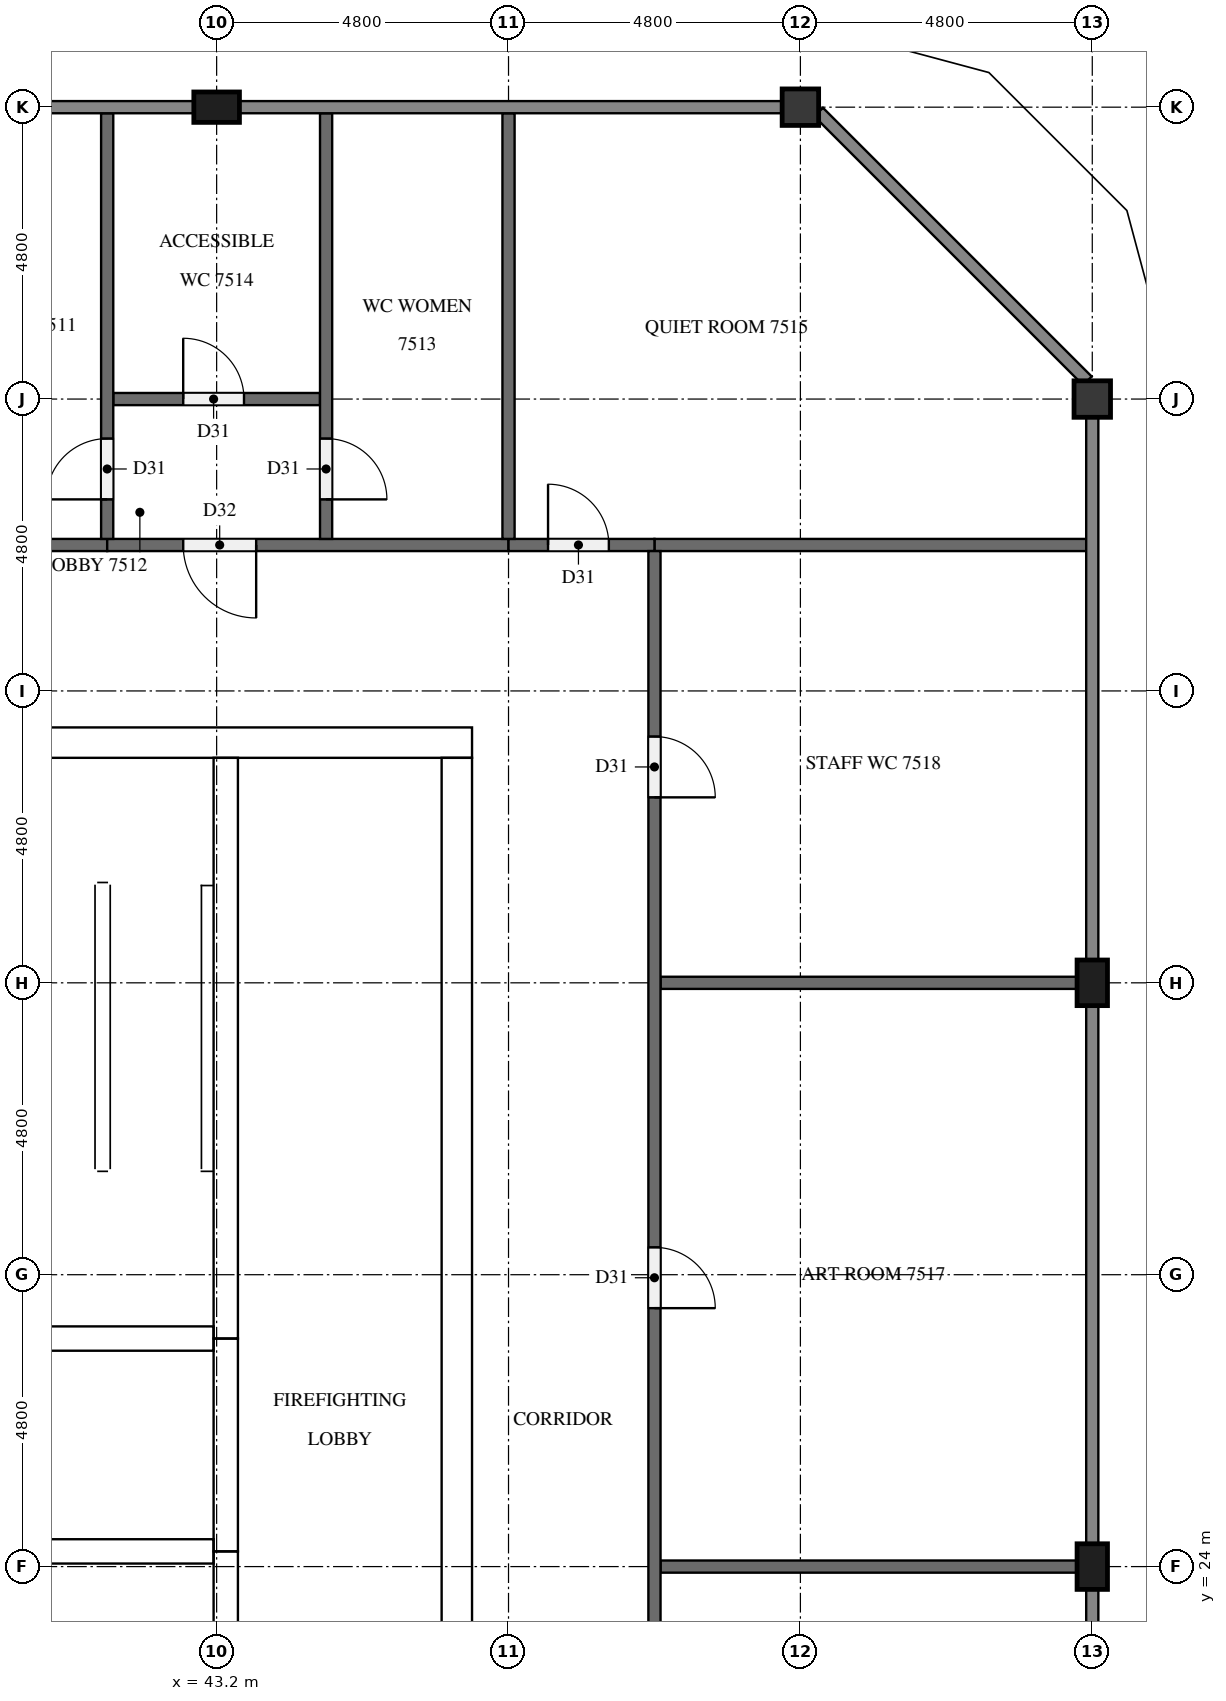
"""IFC4 building model, lengths in metres.
Left out: names, types, materials, properties, quantities, classifications, styles, units other than length and angle.
Written with IfcOpenShell. Run it as: python <this file> out.ifc"""

import sys

from ifc_helpers import new_model, si_unit, direction, frame, frame_2d, origin, origin_2d, place, context, subcontext, project, spatial, rectangle, extrude, element, fill, save


model = new_model("IFC4")
c1 = context("Model", 3, precision=1e-05, world=origin(), true_north=direction((0.0, 1.0)))
c2 = subcontext(c1, "Body", "Model", "MODEL_VIEW")
j1 = project(units=[si_unit("LENGTHUNIT", "METRE"), si_unit("PLANEANGLEUNIT", "RADIAN")], contexts=[c1])
p1 = place(None, origin())
s1 = spatial("IfcSite", under=j1, at=p1, CompositionType="ELEMENT")
p2 = place(p1, origin())
s2 = spatial("IfcBuilding", under=s1, at=p2, CompositionType="ELEMENT")
p3 = place(p2, frame((0.0, 0.0, 286.1)))
s3 = spatial("IfcBuildingStorey", under=s2, at=p3, CompositionType="ELEMENT", Elevation=286.1)
p4 = place(p3, frame((15.0, 37.55, 0.0), z_axis=(0.0, 0.0, 1.0), x_axis=(1.0, 0.0, 0.0)))
e1 = element("IfcWall", 1, at=p4, inside=s3, PredefinedType="SHEAR", context=c2, shape_type="SweptSolid", body=[
    extrude(rectangle(XDim=32.4, YDim=0.5, at=frame_2d((16.2, 0.0))), origin(), (0.0, 0.0, 1.0), 5.1),
])
p5 = place(p4, frame((15.3, 0.0, 0.0)))
e2 = element("IfcOpeningElement", 2, at=p5, cuts=e1, PredefinedType="OPENING", context=c2, shape_type="SweptSolid", body=[
    extrude(rectangle(XDim=1.8, YDim=2.1, at=frame_2d((0.9, 1.05))), frame((0.0, 0.26, 0.0), z_axis=(0.0, -1.0, 0.0), x_axis=(1.0, 0.0, 0.0)), (0.0, 0.0, 1.0), 0.52),
])
p6 = place(p4, frame((1.282, 0.0, 0.0)))
e3 = element("IfcOpeningElement", 3, at=p6, cuts=e1, PredefinedType="OPENING", context=c2, shape_type="SweptSolid", body=[
    extrude(rectangle(XDim=1.0, YDim=2.1, at=frame_2d((0.5, 1.05))), frame((0.0, 0.26, 0.0), z_axis=(0.0, -1.0, 0.0), x_axis=(1.0, 0.0, 0.0)), (0.0, 0.0, 1.0), 0.52),
])
p7 = place(p4, frame((5.082, 0.0, 0.0)))
e4 = element("IfcOpeningElement", 4, at=p7, cuts=e1, PredefinedType="OPENING", context=c2, shape_type="SweptSolid", body=[
    extrude(rectangle(XDim=1.0, YDim=2.1, at=frame_2d((0.5, 1.05))), frame((0.0, 0.26, 0.0), z_axis=(0.0, -1.0, 0.0), x_axis=(1.0, 0.0, 0.0)), (0.0, 0.0, 1.0), 0.52),
])
p8 = place(p3, frame((47.15, 15.5, 0.0), z_axis=(0.0, 0.0, 1.0), x_axis=(0.0, 1.0, 0.0)))
e5 = element("IfcWall", 5, at=p8, inside=s3, PredefinedType="SHEAR", context=c2, shape_type="SweptSolid", body=[
    extrude(rectangle(XDim=21.8, YDim=0.5, at=frame_2d((10.9, 0.0))), origin(), (0.0, 0.0, 1.0), 5.1),
])
p9 = place(p8, frame((10.6, 0.0, 0.0)))
e6 = element("IfcOpeningElement", 6, at=p9, cuts=e5, PredefinedType="OPENING", context=c2, shape_type="SweptSolid", body=[
    extrude(rectangle(XDim=1.2, YDim=2.1, at=frame_2d((0.6, 1.05))), frame((0.0, 0.26, 0.0), z_axis=(0.0, -1.0, 0.0), x_axis=(1.0, 0.0, 0.0)), (0.0, 0.0, 1.0), 0.52),
])
p10 = place(p3, frame((43.35, 15.5, 0.0), z_axis=(0.0, 0.0, 1.0), x_axis=(0.0, 1.0, 0.0)))
e7 = element("IfcWall", 7, at=p10, inside=s3, PredefinedType="SHEAR", context=c2, shape_type="SweptSolid", body=[
    extrude(rectangle(XDim=8.75, YDim=0.4, at=frame_2d((4.375, 0.0))), origin(), (0.0, 0.0, 1.0), 5.1),
])
p11 = place(p10, frame((0.7, 0.0, 0.0)))
e8 = element("IfcOpeningElement", 8, at=p11, cuts=e7, PredefinedType="OPENING", context=c2, shape_type="SweptSolid", body=[
    extrude(rectangle(XDim=1.2, YDim=2.1, at=frame_2d((0.6, 1.05))), frame((0.0, 0.21, 0.0), z_axis=(0.0, -1.0, 0.0), x_axis=(1.0, 0.0, 0.0)), (0.0, 0.0, 1.0), 0.42),
])
p12 = place(p3, frame((43.35, 24.25, 0.0), z_axis=(0.0, 0.0, 1.0), x_axis=(0.0, 1.0, 0.0)))
e9 = element("IfcWall", 9, at=p12, inside=s3, PredefinedType="SHEAR", context=c2, shape_type="SweptSolid", body=[
    extrude(rectangle(XDim=3.5, YDim=0.4, at=frame_2d((1.75, 0.0))), origin(), (0.0, 0.0, 1.0), 5.1),
])
p13 = place(p12, frame((1.2, 0.0, 0.0)))
e10 = element("IfcOpeningElement", 10, at=p13, cuts=e9, PredefinedType="OPENING", context=c2, shape_type="SweptSolid", body=[
    extrude(rectangle(XDim=1.1, YDim=2.1, at=frame_2d((0.55, 1.05))), frame((0.0, 0.21, 0.0), z_axis=(0.0, -1.0, 0.0), x_axis=(1.0, 0.0, 0.0)), (0.0, 0.0, 1.0), 0.42),
])
p14 = place(p3, frame((43.35, 27.75, 0.0), z_axis=(0.0, 0.0, 1.0), x_axis=(0.0, 1.0, 0.0)))
e11 = element("IfcWall", 11, at=p14, inside=s3, PredefinedType="SHEAR", context=c2, shape_type="SweptSolid", body=[
    extrude(rectangle(XDim=9.55, YDim=0.4, at=frame_2d((4.775, 0.0))), origin(), (0.0, 0.0, 1.0), 5.1),
])
p15 = place(p14, frame((7.65, 0.0, 0.0)))
e12 = element("IfcOpeningElement", 12, at=p15, cuts=e11, PredefinedType="OPENING", context=c2, shape_type="SweptSolid", body=[
    extrude(rectangle(XDim=1.2, YDim=2.1, at=frame_2d((0.6, 1.05))), frame((0.0, 0.21, 0.0), z_axis=(0.0, -1.0, 0.0), x_axis=(1.0, 0.0, 0.0)), (0.0, 0.0, 1.0), 0.42),
])
for number, where, z_axis, x_axis in (
    (13, (39.5, 24.25, 0.0), (0.0, 0.0, 1.0), (1.0, 0.0, 0.0)),
    (14, (39.5, 27.75, 0.0), (0.0, 0.0, 1.0), (1.0, 0.0, 0.0)),
):
    element("IfcWall", number, at=place(p3, frame(where, z_axis=z_axis, x_axis=x_axis)), inside=s3, PredefinedType="SHEAR", context=c2, shape_type="SweptSolid", body=[
        extrude(rectangle(XDim=3.65, YDim=0.4, at=frame_2d((1.825, 0.0))), origin(), (0.0, 0.0, 1.0), 5.1),
    ])
for number, where, z_axis, x_axis in (
    (15, (57.6, 24.0, 0.0), (0.0, 0.0, 1.0), (0.0, 1.0, 0.0)),
    (16, (57.6, 33.6, 0.0), (0.0, 0.0, 1.0), (0.0, 1.0, 0.0)),
):
    element("IfcColumn", number, at=place(p3, frame(where, z_axis=z_axis, x_axis=x_axis)), inside=s3, PredefinedType="COLUMN", context=c2, shape_type="SweptSolid", body=[
        extrude(rectangle(XDim=0.75, YDim=0.5, at=origin_2d()), origin(), (0.0, 0.0, 1.0), 5.1),
    ])
for number, where, z_axis, x_axis in (
    (17, (57.6, 43.2, 0.0), (0.0, 0.0, 1.0), (1.0, 0.0, 0.0)),
    (18, (52.8, 48.0, 0.0), (0.0, 0.0, 1.0), (1.0, 0.0, 0.0)),
):
    element("IfcColumn", number, at=place(p3, frame(where, z_axis=z_axis, x_axis=x_axis)), inside=s3, PredefinedType="COLUMN", context=c2, shape_type="SweptSolid", body=[
        extrude(rectangle(XDim=0.6, YDim=0.6, at=origin_2d()), origin(), (0.0, 0.0, 1.0), 5.1),
    ])
p16 = place(p3, frame((43.2, 48.0, 0.0), z_axis=(0.0, 0.0, 1.0), x_axis=(1.0, 0.0, 0.0)))
e19 = element("IfcColumn", 19, at=p16, inside=s3, PredefinedType="COLUMN", context=c2, shape_type="SweptSolid", body=[
    extrude(rectangle(XDim=0.75, YDim=0.5, at=origin_2d()), origin(), (0.0, 0.0, 1.0), 5.1),
])
for number, where, z_axis, x_axis in (
    (20, (50.5, 24.0, 0.0), (0.0, 0.0, 1.0), (1.0, 0.0, 0.0)),
    (21, (50.5, 33.6, 0.0), (0.0, 0.0, 1.0), (1.0, 0.0, 0.0)),
):
    element("IfcWall", number, at=place(p3, frame(where, z_axis=z_axis, x_axis=x_axis)), inside=s3, PredefinedType="PARTITIONING", context=c2, shape_type="SweptSolid", body=[
        extrude(rectangle(XDim=7.0, YDim=0.2, at=frame_2d((3.5, 0.0))), origin(), (0.0, 0.0, 1.0), 5.1),
    ])
p17 = place(p3, frame((50.4, 40.8, 0.0), z_axis=(0.0, 0.0, 1.0), x_axis=(1.0, 0.0, 0.0)))
e22 = element("IfcWall", 22, at=p17, inside=s3, PredefinedType="PARTITIONING", context=c2, shape_type="SweptSolid", body=[
    extrude(rectangle(XDim=7.1, YDim=0.2, at=frame_2d((3.55, 0.0))), origin(), (0.0, 0.0, 1.0), 5.1),
])
p18 = place(p3, frame((12.0, 40.8, 0.0), z_axis=(0.0, 0.0, 1.0), x_axis=(1.0, 0.0, 0.0)))
e23 = element("IfcWall", 23, at=p18, inside=s3, PredefinedType="PARTITIONING", context=c2, shape_type="SweptSolid", body=[
    extrude(rectangle(XDim=29.4, YDim=0.2, at=frame_2d((14.7, 0.0))), origin(), (0.0, 0.0, 1.0), 5.1),
])
p19 = place(p18, frame((3.05, 0.0, 0.0)))
e24 = element("IfcOpeningElement", 24, at=p19, cuts=e23, PredefinedType="OPENING", context=c2, shape_type="SweptSolid", body=[
    extrude(rectangle(XDim=1.0, YDim=2.1, at=frame_2d((0.5, 1.05))), frame((0.0, 0.11, 0.0), z_axis=(0.0, -1.0, 0.0), x_axis=(1.0, 0.0, 0.0)), (0.0, 0.0, 1.0), 0.22),
])
p20 = place(p18, frame((11.55, 0.0, 0.0)))
e25 = element("IfcOpeningElement", 25, at=p20, cuts=e23, PredefinedType="OPENING", context=c2, shape_type="SweptSolid", body=[
    extrude(rectangle(XDim=1.0, YDim=2.1, at=frame_2d((0.5, 1.05))), frame((0.0, 0.11, 0.0), z_axis=(0.0, -1.0, 0.0), x_axis=(1.0, 0.0, 0.0)), (0.0, 0.0, 1.0), 0.22),
])
p21 = place(p18, frame((21.05, 0.0, 0.0)))
e26 = element("IfcOpeningElement", 26, at=p21, cuts=e23, PredefinedType="OPENING", context=c2, shape_type="SweptSolid", body=[
    extrude(rectangle(XDim=1.0, YDim=2.1, at=frame_2d((0.5, 1.05))), frame((0.0, 0.11, 0.0), z_axis=(0.0, -1.0, 0.0), x_axis=(1.0, 0.0, 0.0)), (0.0, 0.0, 1.0), 0.22),
])
p22 = place(p3, frame((48.0, 40.8, 0.0), z_axis=(0.0, 0.0, 1.0), x_axis=(-1.0, 0.0, 0.0)))
e27 = element("IfcWall", 27, at=p22, inside=s3, PredefinedType="PARTITIONING", context=c2, shape_type="SweptSolid", body=[
    extrude(rectangle(XDim=6.6, YDim=0.2, at=frame_2d((3.3, 0.0))), origin(), (0.0, 0.0, 1.0), 5.1),
])
p23 = place(p22, frame((4.15, 0.0, 0.0)))
e28 = element("IfcOpeningElement", 28, at=p23, cuts=e27, PredefinedType="OPENING", context=c2, shape_type="SweptSolid", body=[
    extrude(rectangle(XDim=1.2, YDim=2.1, at=frame_2d((0.6, 1.05))), frame((0.0, 0.11, 0.0), z_axis=(0.0, -1.0, 0.0), x_axis=(1.0, 0.0, 0.0)), (0.0, 0.0, 1.0), 0.22),
])
p24 = place(p3, frame((48.0, 40.8, 0.0), z_axis=(0.0, 0.0, 1.0), x_axis=(1.0, 0.0, 0.0)))
e29 = element("IfcWall", 29, at=p24, inside=s3, PredefinedType="PARTITIONING", context=c2, shape_type="SweptSolid", body=[
    extrude(rectangle(XDim=2.4, YDim=0.2, at=frame_2d((1.2, 0.0))), origin(), (0.0, 0.0, 1.0), 5.1),
])
p25 = place(p24, frame((0.65, 0.0, 0.0)))
e30 = element("IfcOpeningElement", 30, at=p25, cuts=e29, PredefinedType="OPENING", context=c2, shape_type="SweptSolid", body=[
    extrude(rectangle(XDim=1.0, YDim=2.1, at=frame_2d((0.5, 1.05))), frame((0.0, 0.11, 0.0), z_axis=(0.0, -1.0, 0.0), x_axis=(1.0, 0.0, 0.0)), (0.0, 0.0, 1.0), 0.22),
])
p26 = place(p3, frame((41.5, 43.2, 0.0), z_axis=(0.0, 0.0, 1.0), x_axis=(1.0, 0.0, 0.0)))
e31 = element("IfcWall", 31, at=p26, inside=s3, PredefinedType="PARTITIONING", context=c2, shape_type="SweptSolid", body=[
    extrude(rectangle(XDim=3.4, YDim=0.2, at=frame_2d((1.7, 0.0))), origin(), (0.0, 0.0, 1.0), 5.1),
])
p27 = place(p26, frame((1.15, 0.0, 0.0)))
e32 = element("IfcOpeningElement", 32, at=p27, cuts=e31, PredefinedType="OPENING", context=c2, shape_type="SweptSolid", body=[
    extrude(rectangle(XDim=1.0, YDim=2.1, at=frame_2d((0.5, 1.05))), frame((0.0, 0.11, 0.0), z_axis=(0.0, -1.0, 0.0), x_axis=(1.0, 0.0, 0.0)), (0.0, 0.0, 1.0), 0.22),
])
p28 = place(p3, frame((41.4, 40.9, 0.0), z_axis=(0.0, 0.0, 1.0), x_axis=(0.0, 1.0, 0.0)))
e33 = element("IfcWall", 33, at=p28, inside=s3, PredefinedType="PARTITIONING", context=c2, shape_type="SweptSolid", body=[
    extrude(rectangle(XDim=7.0, YDim=0.2, at=frame_2d((3.5, 0.0))), origin(), (0.0, 0.0, 1.0), 5.1),
])
p29 = place(p28, frame((0.65, 0.0, 0.0)))
e34 = element("IfcOpeningElement", 34, at=p29, cuts=e33, PredefinedType="OPENING", context=c2, shape_type="SweptSolid", body=[
    extrude(rectangle(XDim=1.0, YDim=2.1, at=frame_2d((0.5, 1.05))), frame((0.0, 0.11, 0.0), z_axis=(0.0, -1.0, 0.0), x_axis=(1.0, 0.0, 0.0)), (0.0, 0.0, 1.0), 0.22),
])
p30 = place(p3, frame((45.0, 47.9, 0.0), z_axis=(0.0, 0.0, 1.0), x_axis=(0.0, -1.0, 0.0)))
e35 = element("IfcWall", 35, at=p30, inside=s3, PredefinedType="PARTITIONING", context=c2, shape_type="SweptSolid", body=[
    extrude(rectangle(XDim=7.0, YDim=0.2, at=frame_2d((3.5, 0.0))), origin(), (0.0, 0.0, 1.0), 5.1),
])
p31 = place(p30, frame((5.35, 0.0, 0.0)))
e36 = element("IfcOpeningElement", 36, at=p31, cuts=e35, PredefinedType="OPENING", context=c2, shape_type="SweptSolid", body=[
    extrude(rectangle(XDim=1.0, YDim=2.1, at=frame_2d((0.5, 1.05))), frame((0.0, 0.11, 0.0), z_axis=(0.0, -1.0, 0.0), x_axis=(1.0, 0.0, 0.0)), (0.0, 0.0, 1.0), 0.22),
])
p32 = place(p3, frame((48.0, 40.9, 0.0), z_axis=(0.0, 0.0, 1.0), x_axis=(0.0, 1.0, 0.0)))
e37 = element("IfcWall", 37, at=p32, inside=s3, PredefinedType="PARTITIONING", context=c2, shape_type="SweptSolid", body=[
    extrude(rectangle(XDim=7.0, YDim=0.2, at=frame_2d((3.5, 0.0))), origin(), (0.0, 0.0, 1.0), 5.1),
])
p33 = place(p3, frame((50.4, 40.7, 0.0), z_axis=(0.0, 0.0, 1.0), x_axis=(0.0, -1.0, 0.0)))
e38 = element("IfcWall", 38, at=p33, inside=s3, PredefinedType="PARTITIONING", context=c2, shape_type="SweptSolid", body=[
    extrude(rectangle(XDim=28.6, YDim=0.2, at=frame_2d((14.3, 0.0))), origin(), (0.0, 0.0, 1.0), 5.1),
])
p34 = place(p33, frame((22.15, 0.0, 0.0)))
e39 = element("IfcOpeningElement", 39, at=p34, cuts=e38, PredefinedType="OPENING", context=c2, shape_type="SweptSolid", body=[
    extrude(rectangle(XDim=1.0, YDim=2.1, at=frame_2d((0.5, 1.05))), frame((0.0, 0.11, 0.0), z_axis=(0.0, -1.0, 0.0), x_axis=(1.0, 0.0, 0.0)), (0.0, 0.0, 1.0), 0.22),
])
p35 = place(p33, frame((11.45, 0.0, 0.0)))
e40 = element("IfcOpeningElement", 40, at=p35, cuts=e38, PredefinedType="OPENING", context=c2, shape_type="SweptSolid", body=[
    extrude(rectangle(XDim=1.0, YDim=2.1, at=frame_2d((0.5, 1.05))), frame((0.0, 0.11, 0.0), z_axis=(0.0, -1.0, 0.0), x_axis=(1.0, 0.0, 0.0)), (0.0, 0.0, 1.0), 0.22),
])
p36 = place(p33, frame((3.05, 0.0, 0.0)))
e41 = element("IfcOpeningElement", 41, at=p36, cuts=e38, PredefinedType="OPENING", context=c2, shape_type="SweptSolid", body=[
    extrude(rectangle(XDim=1.0, YDim=2.1, at=frame_2d((0.5, 1.05))), frame((0.0, 0.11, 0.0), z_axis=(0.0, -1.0, 0.0), x_axis=(1.0, 0.0, 0.0)), (0.0, 0.0, 1.0), 0.22),
])
p37 = place(p13, origin())
e42 = element("IfcDoor", 42, at=p37, inside=s3, OperationType="DOUBLE_DOOR_SLIDING", PredefinedType="DOOR", context=c2, shape_type="SweptSolid", body=[
    extrude(rectangle(XDim=1.1, YDim=2.1, at=frame_2d((0.55, 1.05))), frame((0.0, 0.025, 0.0), z_axis=(0.0, -1.0, 0.0), x_axis=(1.0, 0.0, 0.0)), (0.0, 0.0, 1.0), 0.05),
])
fill(e10, e42)
p38 = place(p15, origin())
e43 = element("IfcDoor", 43, at=p38, inside=s3, OperationType="SINGLE_SWING_LEFT", PredefinedType="DOOR", context=c2, shape_type="SweptSolid", body=[
    extrude(rectangle(XDim=1.2, YDim=2.1, at=frame_2d((0.6, 1.05))), frame((0.0, 0.025, 0.0), z_axis=(0.0, -1.0, 0.0), x_axis=(1.0, 0.0, 0.0)), (0.0, 0.0, 1.0), 0.05),
])
fill(e12, e43)
p39 = place(p9, origin())
e44 = element("IfcDoor", 44, at=p39, inside=s3, OperationType="SINGLE_SWING_LEFT", PredefinedType="DOOR", context=c2, shape_type="SweptSolid", body=[
    extrude(rectangle(XDim=1.2, YDim=2.1, at=frame_2d((0.6, 1.05))), frame((0.0, 0.025, 0.0), z_axis=(0.0, -1.0, 0.0), x_axis=(1.0, 0.0, 0.0)), (0.0, 0.0, 1.0), 0.05),
])
fill(e6, e44)
p40 = place(p23, origin())
e45 = element("IfcDoor", 45, at=p40, inside=s3, OperationType="SINGLE_SWING_LEFT", PredefinedType="DOOR", context=c2, shape_type="SweptSolid", body=[
    extrude(rectangle(XDim=1.2, YDim=2.1, at=frame_2d((0.6, 1.05))), frame((0.0, 0.025, 0.0), z_axis=(0.0, -1.0, 0.0), x_axis=(1.0, 0.0, 0.0)), (0.0, 0.0, 1.0), 0.05),
])
fill(e28, e45)
p41 = place(p29, origin())
e46 = element("IfcDoor", 46, at=p41, inside=s3, OperationType="SINGLE_SWING_LEFT", PredefinedType="DOOR", context=c2, shape_type="SweptSolid", body=[
    extrude(rectangle(XDim=1.0, YDim=2.1, at=frame_2d((0.5, 1.05))), frame((0.0, 0.025, 0.0), z_axis=(0.0, -1.0, 0.0), x_axis=(1.0, 0.0, 0.0)), (0.0, 0.0, 1.0), 0.05),
])
fill(e34, e46)
p42 = place(p31, origin())
e47 = element("IfcDoor", 47, at=p42, inside=s3, OperationType="SINGLE_SWING_RIGHT", PredefinedType="DOOR", context=c2, shape_type="SweptSolid", body=[
    extrude(rectangle(XDim=1.0, YDim=2.1, at=frame_2d((0.5, 1.05))), frame((0.0, 0.025, 0.0), z_axis=(0.0, -1.0, 0.0), x_axis=(1.0, 0.0, 0.0)), (0.0, 0.0, 1.0), 0.05),
])
fill(e36, e47)
p43 = place(p27, origin())
e48 = element("IfcDoor", 48, at=p43, inside=s3, OperationType="SINGLE_SWING_LEFT", PredefinedType="DOOR", context=c2, shape_type="SweptSolid", body=[
    extrude(rectangle(XDim=1.0, YDim=2.1, at=frame_2d((0.5, 1.05))), frame((0.0, 0.025, 0.0), z_axis=(0.0, -1.0, 0.0), x_axis=(1.0, 0.0, 0.0)), (0.0, 0.0, 1.0), 0.05),
])
fill(e32, e48)
p44 = place(p25, origin())
e49 = element("IfcDoor", 49, at=p44, inside=s3, OperationType="SINGLE_SWING_LEFT", PredefinedType="DOOR", context=c2, shape_type="SweptSolid", body=[
    extrude(rectangle(XDim=1.0, YDim=2.1, at=frame_2d((0.5, 1.05))), frame((0.0, 0.025, 0.0), z_axis=(0.0, -1.0, 0.0), x_axis=(1.0, 0.0, 0.0)), (0.0, 0.0, 1.0), 0.05),
])
fill(e30, e49)
p45 = place(p35, origin())
e50 = element("IfcDoor", 50, at=p45, inside=s3, OperationType="SINGLE_SWING_RIGHT", PredefinedType="DOOR", context=c2, shape_type="SweptSolid", body=[
    extrude(rectangle(XDim=1.0, YDim=2.1, at=frame_2d((0.5, 1.05))), frame((0.0, 0.025, 0.0), z_axis=(0.0, -1.0, 0.0), x_axis=(1.0, 0.0, 0.0)), (0.0, 0.0, 1.0), 0.05),
])
fill(e40, e50)
p46 = place(p36, origin())
e51 = element("IfcDoor", 51, at=p46, inside=s3, OperationType="SINGLE_SWING_RIGHT", PredefinedType="DOOR", context=c2, shape_type="SweptSolid", body=[
    extrude(rectangle(XDim=1.0, YDim=2.1, at=frame_2d((0.5, 1.05))), frame((0.0, 0.025, 0.0), z_axis=(0.0, -1.0, 0.0), x_axis=(1.0, 0.0, 0.0)), (0.0, 0.0, 1.0), 0.05),
])
fill(e41, e51)
save(model, sys.argv[1])
